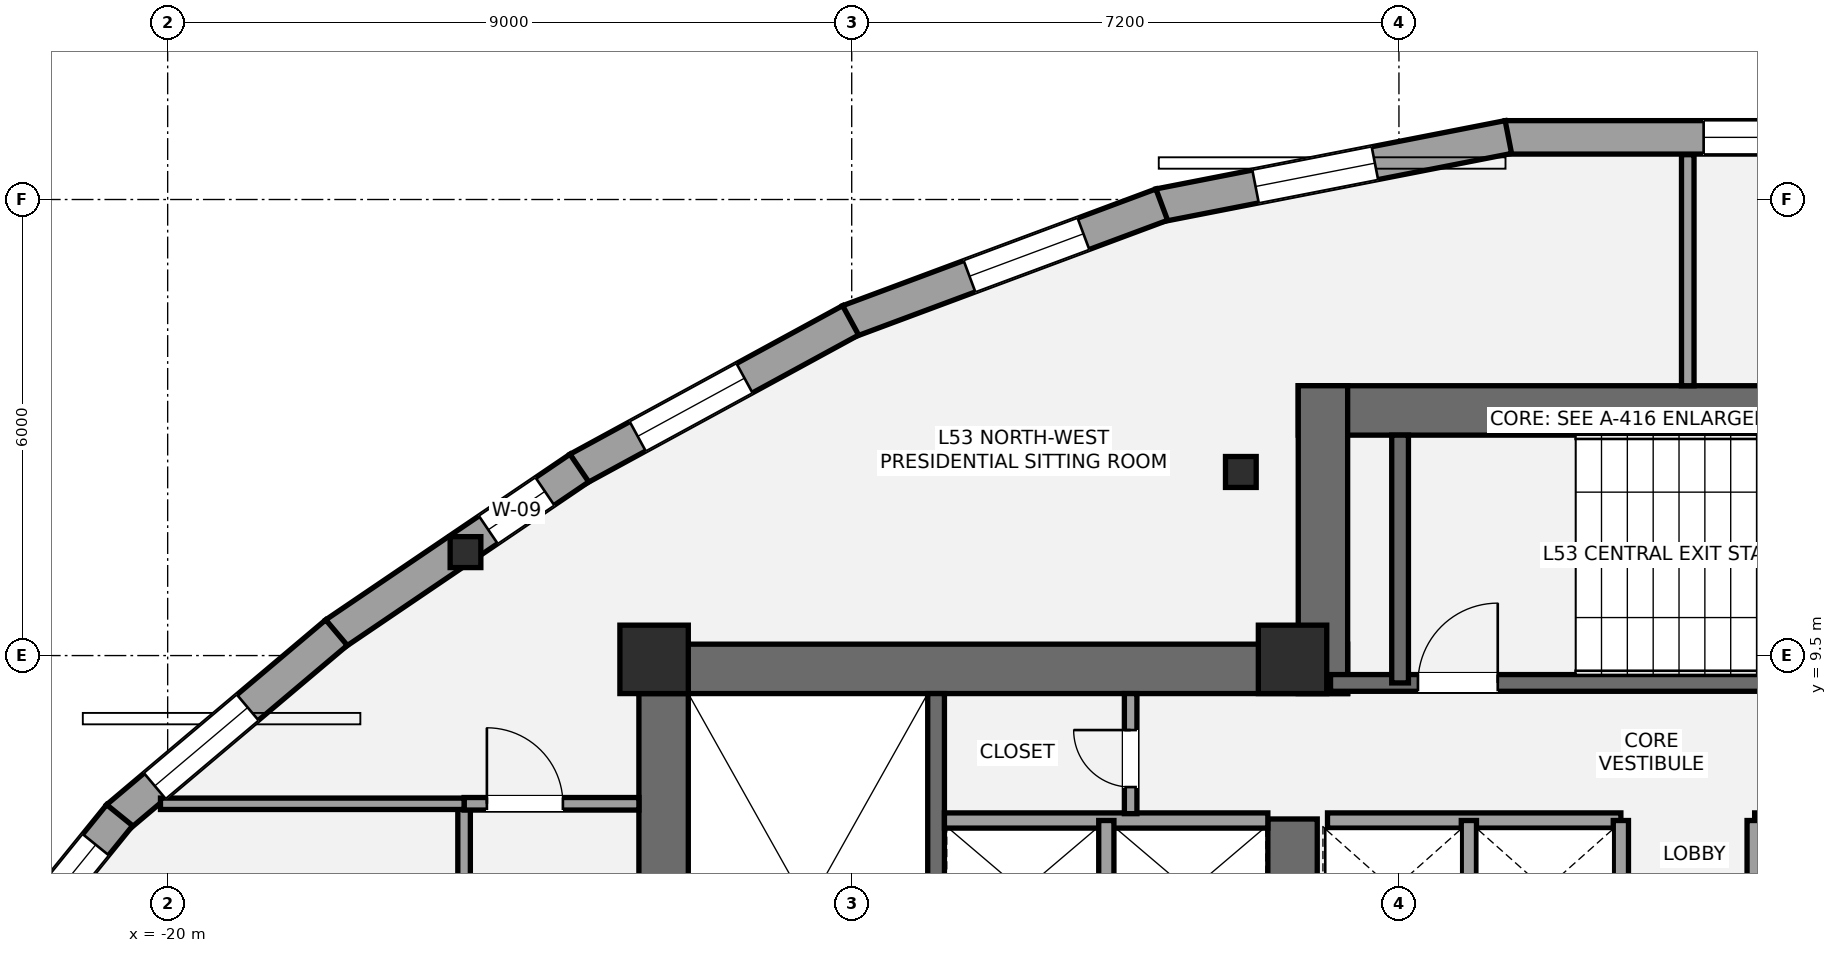
"""IFC4 building model, lengths in metres.
Left out: names, types, materials, properties, quantities, classifications, styles, units other than length and angle.
Written with IfcOpenShell. Run it as: python <this file> out.ifc"""

import sys

from ifc_helpers import new_model, si_unit, direction, frame, frame_2d, origin, origin_2d, place, context, subcontext, project, spatial, rectangle, i_section, extrude, element, fill, save


model = new_model("IFC4")
c1 = context("Model", 3, precision=1e-05, world=origin(), true_north=direction((0.0, 1.0)))
c2 = subcontext(c1, "Body", "Model", "MODEL_VIEW")
j1 = project(units=[si_unit("LENGTHUNIT", "METRE"), si_unit("PLANEANGLEUNIT", "RADIAN")], contexts=[c1])
p1 = place(None, origin())
s1 = spatial("IfcSite", under=j1, at=p1, CompositionType="ELEMENT")
p2 = place(p1, origin())
s2 = spatial("IfcBuilding", under=s1, at=p2, CompositionType="ELEMENT")
p3 = place(p2, frame((0.0, 0.0, 191.8)))
s3 = spatial("IfcBuildingStorey", under=s2, at=p3, CompositionType="ELEMENT", Elevation=191.8)
p4 = place(p3, frame((-13.475, 1.2, 0.0), z_axis=(0.0, 0.0, 1.0), x_axis=(0.0, 1.0, 0.0)))
e1 = element("IfcWall", 1, at=p4, inside=s3, PredefinedType="SHEAR", context=c2, shape_type="SweptSolid", body=[
    extrude(rectangle(XDim=8.45, YDim=0.65, at=frame_2d((4.225, 0.0))), origin(), (0.0, 0.0, 1.0), 3.2),
])
p5 = place(p3, frame((-13.8, 9.325, 0.0), z_axis=(0.0, 0.0, 1.0), x_axis=(1.0, 0.0, 0.0)))
e2 = element("IfcWall", 2, at=p5, inside=s3, PredefinedType="SHEAR", context=c2, shape_type="SweptSolid", body=[
    extrude(rectangle(XDim=9.325, YDim=0.65, at=frame_2d((4.663, 0.0))), origin(), (0.0, 0.0, 1.0), 3.2),
])
p6 = place(p3, frame((-5.2, 5.35, 0.0), z_axis=(0.0, 0.0, 1.0), x_axis=(0.0, 1.0, 0.0)))
e3 = element("IfcWall", 3, at=p6, inside=s3, PredefinedType="SHEAR", context=c2, shape_type="SweptSolid", body=[
    extrude(rectangle(XDim=2.0, YDim=0.65, at=frame_2d((1.0, 0.0))), origin(), (0.0, 0.0, 1.0), 3.2),
])
p7 = place(p3, frame((-9.89, 1.85, 0.0), z_axis=(0.0, 0.0, 1.0), x_axis=(0.0, 1.0, 0.0)))
e4 = element("IfcWall", 4, at=p7, inside=s3, PredefinedType="SHEAR", context=c2, shape_type="SweptSolid", body=[
    extrude(rectangle(XDim=7.15, YDim=0.22, at=frame_2d((3.575, 0.0))), origin(), (0.0, 0.0, 1.0), 3.2),
])
p8 = place(p3, frame((-5.125, 12.725, 0.0), z_axis=(0.0, 0.0, 1.0), x_axis=(1.0, 0.0, 0.0)))
e5 = element("IfcWall", 5, at=p8, inside=s3, PredefinedType="SHEAR", context=c2, shape_type="SweptSolid", body=[
    extrude(rectangle(XDim=10.25, YDim=0.65, at=frame_2d((5.125, 0.0))), origin(), (0.0, 0.0, 1.0), 3.2),
])
p9 = place(p3, frame((-4.8, 9.0, 0.0), z_axis=(0.0, 0.0, 1.0), x_axis=(0.0, 1.0, 0.0)))
e6 = element("IfcWall", 6, at=p9, inside=s3, PredefinedType="SHEAR", context=c2, shape_type="SweptSolid", body=[
    extrude(rectangle(XDim=4.05, YDim=0.65, at=frame_2d((2.025, 0.0))), origin(), (0.0, 0.0, 1.0), 3.2),
])
p10 = place(p3, frame((-4.7, 9.14, 0.0), z_axis=(0.0, 0.0, 1.0), x_axis=(1.0, 0.0, 0.0)))
e7 = element("IfcWall", 7, at=p10, inside=s3, PredefinedType="SHEAR", context=c2, shape_type="SweptSolid", body=[
    extrude(rectangle(XDim=9.3, YDim=0.22, at=frame_2d((4.65, 0.0))), origin(), (0.0, 0.0, 1.0), 3.2),
])
p11 = place(p10, frame((1.15, 0.0, 0.0)))
e8 = element("IfcOpeningElement", 8, at=p11, cuts=e7, PredefinedType="OPENING", context=c2, shape_type="SweptSolid", body=[
    extrude(rectangle(XDim=1.05, YDim=2.15, at=frame_2d((0.525, 1.075))), frame((0.0, 0.12, 0.0), z_axis=(0.0, -1.0, 0.0), x_axis=(1.0, 0.0, 0.0)), (0.0, 0.0, 1.0), 0.24),
])
p12 = place(p3, frame((-3.785, 9.14, 0.0), z_axis=(0.0, 0.0, 1.0), x_axis=(0.0, 1.0, 0.0)))
e9 = element("IfcWall", 9, at=p12, inside=s3, PredefinedType="SHEAR", context=c2, shape_type="SweptSolid", body=[
    extrude(rectangle(XDim=3.26, YDim=0.22, at=frame_2d((1.63, 0.0))), origin(), (0.0, 0.0, 1.0), 3.2),
])
for number, where, z_axis, x_axis in (
    (10, (-13.6, 9.45, 0.0), (0.0, 0.0, 1.0), (1.0, 0.0, 0.0)),
    (11, (-5.2, 9.45, 0.0), (0.0, 0.0, 1.0), (1.0, 0.0, 0.0)),
):
    element("IfcColumn", number, at=place(p3, frame(where, z_axis=z_axis, x_axis=x_axis)), inside=s3, PredefinedType="COLUMN", context=c2, shape_type="SweptSolid", body=[
        extrude(rectangle(XDim=0.9, YDim=0.9, at=origin_2d()), origin(), (0.0, 0.0, 1.0), 3.2),
    ])
for number, where, z_axis, x_axis in (
    (12, (-5.88, 11.915, 0.0), (0.0, 0.0, 1.0), (1.0, 0.0, 0.0)),
    (13, (-16.082, 10.861, 0.0), (0.0, 0.0, 1.0), (1.0, 0.0, 0.0)),
):
    element("IfcColumn", number, at=place(p3, frame(where, z_axis=z_axis, x_axis=x_axis)), inside=s3, PredefinedType="COLUMN", context=c2, shape_type="SweptSolid", body=[
        extrude(i_section(OverallWidth=0.404, OverallDepth=0.407, WebThickness=0.027, FlangeThickness=0.044, at=origin_2d()), origin(), (0.0, 0.0, 1.0), 3.2),
    ])
p13 = place(p3, frame((-2.403, 16.318, 0.0), z_axis=(0.0, 0.0, 1.0), x_axis=(1.0, 0.0, 0.0)))
e14 = element("IfcWall", 14, at=p13, inside=s3, PredefinedType="STANDARD", context=c2, shape_type="SweptSolid", body=[
    extrude(rectangle(XDim=4.805, YDim=0.44, at=frame_2d((2.403, 0.0))), origin(), (0.0, 0.0, 1.0), 2.315),
])
p14 = place(p13, frame((2.612, 0.0, 0.58)))
e15 = element("IfcOpeningElement", 15, at=p14, cuts=e14, PredefinedType="OPENING", context=c2, shape_type="SweptSolid", body=[
    extrude(rectangle(XDim=1.6, YDim=1.55, at=frame_2d((0.8, 0.775))), frame((0.0, 0.23, 0.0), z_axis=(0.0, -1.0, 0.0), x_axis=(1.0, 0.0, 0.0)), (0.0, 0.0, 1.0), 0.46),
])
p15 = place(p3, frame((-6.955, 15.423, 0.0), z_axis=(0.0, 0.0, 1.0), x_axis=(0.981406109785, 0.191942823979, 0.0)))
e16 = element("IfcWall", 16, at=p15, inside=s3, PredefinedType="STANDARD", context=c2, shape_type="SweptSolid", body=[
    extrude(rectangle(XDim=4.682, YDim=0.44, at=frame_2d((2.341, 0.0))), origin(), (0.0, 0.0, 1.0), 2.315),
])
p16 = place(p15, frame((1.293, 0.0, 0.58)))
e17 = element("IfcOpeningElement", 17, at=p16, cuts=e16, PredefinedType="OPENING", context=c2, shape_type="SweptSolid", body=[
    extrude(rectangle(XDim=1.6, YDim=1.55, at=frame_2d((0.8, 0.775))), frame((0.0, 0.23, 0.0), z_axis=(0.0, -1.0, 0.0), x_axis=(1.0, 0.0, 0.0)), (0.0, 0.0, 1.0), 0.46),
])
p17 = place(p3, frame((-11.042, 13.897, 0.0), z_axis=(0.0, 0.0, 1.0), x_axis=(0.937088879832, 0.349090863953, 0.0)))
e18 = element("IfcWall", 18, at=p17, inside=s3, PredefinedType="STANDARD", context=c2, shape_type="SweptSolid", body=[
    extrude(rectangle(XDim=4.398, YDim=0.44, at=frame_2d((2.199, 0.0))), origin(), (0.0, 0.0, 1.0), 2.315),
])
p18 = place(p17, frame((1.699, 0.0, 0.58)))
e19 = element("IfcOpeningElement", 19, at=p18, cuts=e18, PredefinedType="OPENING", context=c2, shape_type="SweptSolid", body=[
    extrude(rectangle(XDim=1.6, YDim=1.55, at=frame_2d((0.8, 0.775))), frame((0.0, 0.23, 0.0), z_axis=(0.0, -1.0, 0.0), x_axis=(1.0, 0.0, 0.0)), (0.0, 0.0, 1.0), 0.46),
])
p19 = place(p3, frame((-14.602, 11.956, 0.0), z_axis=(0.0, 0.0, 1.0), x_axis=(0.878158075839, 0.478370561217, 0.0)))
e20 = element("IfcWall", 20, at=p19, inside=s3, PredefinedType="STANDARD", context=c2, shape_type="SweptSolid", body=[
    extrude(rectangle(XDim=4.085, YDim=0.44, at=frame_2d((2.043, 0.0))), origin(), (0.0, 0.0, 1.0), 2.315),
])
p20 = place(p19, frame((0.895, 0.0, 0.58)))
e21 = element("IfcOpeningElement", 21, at=p20, cuts=e20, PredefinedType="OPENING", context=c2, shape_type="SweptSolid", body=[
    extrude(rectangle(XDim=1.6, YDim=1.55, at=frame_2d((0.8, 0.775))), frame((0.0, 0.23, 0.0), z_axis=(0.0, -1.0, 0.0), x_axis=(1.0, 0.0, 0.0)), (0.0, 0.0, 1.0), 0.46),
])
p21 = place(p3, frame((-17.797, 9.788, 0.0), z_axis=(0.0, 0.0, 1.0), x_axis=(0.827690675663, 0.561184591218, 0.0)))
e22 = element("IfcWall", 22, at=p21, inside=s3, PredefinedType="STANDARD", context=c2, shape_type="SweptSolid", body=[
    extrude(rectangle(XDim=3.882, YDim=0.44, at=frame_2d((1.941, 0.0))), origin(), (0.0, 0.0, 1.0), 2.315),
])
p22 = place(p21, frame((2.435, 0.0, 0.58)))
e23 = element("IfcOpeningElement", 23, at=p22, cuts=e22, PredefinedType="OPENING", context=c2, shape_type="SweptSolid", body=[
    extrude(rectangle(XDim=0.9, YDim=1.35, at=frame_2d((0.45, 0.675))), frame((0.0, 0.23, 0.0), z_axis=(0.0, -1.0, 0.0), x_axis=(1.0, 0.0, 0.0)), (0.0, 0.0, 1.0), 0.46),
])
p23 = place(p3, frame((-20.661, 7.37, 0.0), z_axis=(0.0, 0.0, 1.0), x_axis=(0.764269547527, 0.644896936512, 0.0)))
e24 = element("IfcWall", 24, at=p23, inside=s3, PredefinedType="STANDARD", context=c2, shape_type="SweptSolid", body=[
    extrude(rectangle(XDim=3.771, YDim=0.44, at=frame_2d((1.886, 0.0))), origin(), (0.0, 0.0, 1.0), 2.315),
])
p24 = place(p23, frame((0.643, 0.0, 0.58)))
e25 = element("IfcOpeningElement", 25, at=p24, cuts=e24, PredefinedType="OPENING", context=c2, shape_type="SweptSolid", body=[
    extrude(rectangle(XDim=1.6, YDim=1.55, at=frame_2d((0.8, 0.775))), frame((0.0, 0.23, 0.0), z_axis=(0.0, -1.0, 0.0), x_axis=(1.0, 0.0, 0.0)), (0.0, 0.0, 1.0), 0.46),
])
p25 = place(p3, frame((-22.897, 4.605, 0.0), z_axis=(0.0, 0.0, 1.0), x_axis=(0.629697919329, 0.776840093193, 0.0)))
e26 = element("IfcWall", 26, at=p25, inside=s3, PredefinedType="STANDARD", context=c2, shape_type="SweptSolid", body=[
    extrude(rectangle(XDim=3.597, YDim=0.44, at=frame_2d((1.799, 0.0))), origin(), (0.0, 0.0, 1.0), 2.315),
])
p26 = place(p25, frame((1.498, 0.0, 0.58)))
e27 = element("IfcOpeningElement", 27, at=p26, cuts=e26, PredefinedType="OPENING", context=c2, shape_type="SweptSolid", body=[
    extrude(rectangle(XDim=1.6, YDim=1.55, at=frame_2d((0.8, 0.775))), frame((0.0, 0.23, 0.0), z_axis=(0.0, -1.0, 0.0), x_axis=(1.0, 0.0, 0.0)), (0.0, 0.0, 1.0), 0.46),
])
p27 = place(p3, frame((-9.78, 7.33, 0.0), z_axis=(0.0, 0.0, 1.0), x_axis=(1.0, 0.0, 0.0)))
e28 = element("IfcWall", 28, at=p27, inside=s3, PredefinedType="SOLIDWALL", context=c2, shape_type="SweptSolid", body=[
    extrude(rectangle(XDim=4.255, YDim=0.2, at=frame_2d((2.127, 0.0))), origin(), (0.0, 0.0, 1.0), 3.02),
])
p28 = place(p3, frame((-7.65, 5.47, 0.0), z_axis=(0.0, 0.0, 1.0), x_axis=(0.0, 1.0, 0.0)))
e29 = element("IfcWall", 29, at=p28, inside=s3, PredefinedType="SOLIDWALL", context=c2, shape_type="SweptSolid", body=[
    extrude(rectangle(XDim=1.86, YDim=0.2, at=frame_2d((0.93, 0.0))), origin(), (0.0, 0.0, 1.0), 3.02),
])
for number, where, z_axis, x_axis in (
    (30, (-4.74, 7.33, 0.0), (0.0, 0.0, 1.0), (1.0, 0.0, 0.0)),
    (31, (0.88, 7.33, 0.0), (0.0, 0.0, 1.0), (1.0, 0.0, 0.0)),
):
    element("IfcWall", number, at=place(p3, frame(where, z_axis=z_axis, x_axis=x_axis)), inside=s3, PredefinedType="SOLIDWALL", context=c2, shape_type="SweptSolid", body=[
        extrude(rectangle(XDim=3.86, YDim=0.2, at=frame_2d((1.93, 0.0))), origin(), (0.0, 0.0, 1.0), 3.02),
    ])
for number, where, z_axis, x_axis in (
    (32, (-2.88, 5.52, 0.0), (0.0, 0.0, 1.0), (0.0, 1.0, 0.0)),
    (33, (-0.88, 5.52, 0.0), (0.0, 0.0, 1.0), (0.0, 1.0, 0.0)),
    (34, (0.88, 5.52, 0.0), (0.0, 0.0, 1.0), (0.0, 1.0, 0.0)),
):
    element("IfcWall", number, at=place(p3, frame(where, z_axis=z_axis, x_axis=x_axis)), inside=s3, PredefinedType="SOLIDWALL", context=c2, shape_type="SweptSolid", body=[
        extrude(rectangle(XDim=1.81, YDim=0.2, at=frame_2d((0.905, 0.0))), origin(), (0.0, 0.0, 1.0), 3.02),
    ])
p29 = place(p3, frame((-7.33, 7.42, 0.0), z_axis=(0.0, 0.0, 1.0), x_axis=(0.0, 1.0, 0.0)))
e35 = element("IfcWall", 35, at=p29, inside=s3, PredefinedType="PARTITIONING", context=c2, shape_type="SweptSolid", body=[
    extrude(rectangle(XDim=1.58, YDim=0.165, at=frame_2d((0.79, 0.0))), origin(), (0.0, 0.0, 1.0), 3.02),
])
p30 = place(p29, frame((0.35, 0.0, 0.0)))
e36 = element("IfcOpeningElement", 36, at=p30, cuts=e35, PredefinedType="OPENING", context=c2, shape_type="SweptSolid", body=[
    extrude(rectangle(XDim=0.75, YDim=2.1, at=frame_2d((0.375, 1.05))), frame((0.0, 0.093, 0.0), z_axis=(0.0, -1.0, 0.0), x_axis=(1.0, 0.0, 0.0)), (0.0, 0.0, 1.0), 0.185),
])
p31 = place(p3, frame((-16.1, -10.663, 0.0), z_axis=(0.0, 0.0, 1.0), x_axis=(0.0, 1.0, 0.0)))
e37 = element("IfcWall", 37, at=p31, inside=s3, PredefinedType="PARTITIONING", context=c2, shape_type="SweptSolid", body=[
    extrude(rectangle(XDim=18.213, YDim=0.165, at=frame_2d((9.107, 0.0))), origin(), (0.0, 0.0, 1.0), 2.473),
])
p32 = place(p31, frame((3.664, 0.0, 0.0)))
e38 = element("IfcOpeningElement", 38, at=p32, cuts=e37, PredefinedType="OPENING", context=c2, shape_type="SweptSolid", body=[
    extrude(rectangle(XDim=0.85, YDim=2.1, at=frame_2d((0.425, 1.05))), frame((0.0, 0.093, 0.0), z_axis=(0.0, -1.0, 0.0), x_axis=(1.0, 0.0, 0.0)), (0.0, 0.0, 1.0), 0.185),
])
p33 = place(p31, frame((6.839, 0.0, 0.0)))
e39 = element("IfcOpeningElement", 39, at=p33, cuts=e37, PredefinedType="OPENING", context=c2, shape_type="SweptSolid", body=[
    extrude(rectangle(XDim=1.0, YDim=2.15, at=frame_2d((0.5, 1.075))), frame((0.0, 0.093, 0.0), z_axis=(0.0, -1.0, 0.0), x_axis=(1.0, 0.0, 0.0)), (0.0, 0.0, 1.0), 0.185),
])
p34 = place(p31, frame((11.264, 0.0, 0.0)))
e40 = element("IfcOpeningElement", 40, at=p34, cuts=e37, PredefinedType="OPENING", context=c2, shape_type="SweptSolid", body=[
    extrude(rectangle(XDim=1.0, YDim=2.15, at=frame_2d((0.5, 1.075))), frame((0.0, 0.093, 0.0), z_axis=(0.0, -1.0, 0.0), x_axis=(1.0, 0.0, 0.0)), (0.0, 0.0, 1.0), 0.185),
])
p35 = place(p31, frame((15.539, 0.0, 0.0)))
e41 = element("IfcOpeningElement", 41, at=p35, cuts=e37, PredefinedType="OPENING", context=c2, shape_type="SweptSolid", body=[
    extrude(rectangle(XDim=1.0, YDim=2.15, at=frame_2d((0.5, 1.075))), frame((0.0, 0.093, 0.0), z_axis=(0.0, -1.0, 0.0), x_axis=(1.0, 0.0, 0.0)), (0.0, 0.0, 1.0), 0.185),
])
p36 = place(p3, frame((-16.1, 7.55, 0.0), z_axis=(0.0, 0.0, 1.0), x_axis=(1.0, 0.0, 0.0)))
e42 = element("IfcWall", 42, at=p36, inside=s3, PredefinedType="PARTITIONING", context=c2, shape_type="SweptSolid", body=[
    extrude(rectangle(XDim=2.3, YDim=0.165, at=frame_2d((1.15, 0.0))), origin(), (0.0, 0.0, 1.0), 3.02),
])
p37 = place(p36, frame((0.3, 0.0, 0.0)))
e43 = element("IfcOpeningElement", 43, at=p37, cuts=e42, PredefinedType="OPENING", context=c2, shape_type="SweptSolid", body=[
    extrude(rectangle(XDim=1.0, YDim=2.15, at=frame_2d((0.5, 1.075))), frame((0.0, 0.093, 0.0), z_axis=(0.0, -1.0, 0.0), x_axis=(1.0, 0.0, 0.0)), (0.0, 0.0, 1.0), 0.185),
])
p38 = place(p3, frame((-20.094, 7.55, 0.0), z_axis=(0.0, 0.0, 1.0), x_axis=(1.0, 0.0, 0.0)))
e44 = element("IfcWall", 44, at=p38, inside=s3, PredefinedType="PLUMBINGWALL", context=c2, shape_type="SweptSolid", body=[
    extrude(rectangle(XDim=3.994, YDim=0.15, at=frame_2d((1.997, 0.0))), origin(), (0.0, 0.0, 1.0), 2.473),
])
p39 = place(p3, frame((0.0, 13.05, 0.0), z_axis=(0.0, 0.0, 1.0), x_axis=(0.0, 1.0, 0.0)))
e45 = element("IfcWall", 45, at=p39, inside=s3, PredefinedType="PARTITIONING", context=c2, shape_type="SweptSolid", body=[
    extrude(rectangle(XDim=3.04, YDim=0.165, at=frame_2d((1.52, 0.0))), origin(), (0.0, 0.0, 1.0), 3.02),
])
p40 = place(p14, origin())
e46 = element("IfcWindow", 46, at=p40, inside=s3, PartitioningType="SINGLE_PANEL", PredefinedType="WINDOW", context=c2, shape_type="SweptSolid", body=[
    extrude(rectangle(XDim=1.6, YDim=1.55, at=frame_2d((0.8, 0.775))), frame((0.0, -0.01, 0.0), z_axis=(0.0, -1.0, 0.0), x_axis=(1.0, 0.0, 0.0)), (0.0, 0.0, 1.0), 0.06),
])
fill(e15, e46)
p41 = place(p16, origin())
e47 = element("IfcWindow", 47, at=p41, inside=s3, PartitioningType="SINGLE_PANEL", PredefinedType="WINDOW", context=c2, shape_type="SweptSolid", body=[
    extrude(rectangle(XDim=1.6, YDim=1.55, at=frame_2d((0.8, 0.775))), frame((0.0, -0.01, 0.0), z_axis=(0.0, -1.0, 0.0), x_axis=(1.0, 0.0, 0.0)), (0.0, 0.0, 1.0), 0.06),
])
fill(e17, e47)
p42 = place(p18, origin())
e48 = element("IfcWindow", 48, at=p42, inside=s3, PartitioningType="SINGLE_PANEL", PredefinedType="WINDOW", context=c2, shape_type="SweptSolid", body=[
    extrude(rectangle(XDim=1.6, YDim=1.55, at=frame_2d((0.8, 0.775))), frame((0.0, -0.01, 0.0), z_axis=(0.0, -1.0, 0.0), x_axis=(1.0, 0.0, 0.0)), (0.0, 0.0, 1.0), 0.06),
])
fill(e19, e48)
p43 = place(p20, origin())
e49 = element("IfcWindow", 49, at=p43, inside=s3, PartitioningType="SINGLE_PANEL", PredefinedType="WINDOW", context=c2, shape_type="SweptSolid", body=[
    extrude(rectangle(XDim=1.6, YDim=1.55, at=frame_2d((0.8, 0.775))), frame((0.0, -0.01, 0.0), z_axis=(0.0, -1.0, 0.0), x_axis=(1.0, 0.0, 0.0)), (0.0, 0.0, 1.0), 0.06),
])
fill(e21, e49)
p44 = place(p22, origin())
e50 = element("IfcWindow", 50, at=p44, inside=s3, PartitioningType="SINGLE_PANEL", PredefinedType="WINDOW", context=c2, shape_type="SweptSolid", body=[
    extrude(rectangle(XDim=0.9, YDim=1.35, at=frame_2d((0.45, 0.675))), frame((0.0, -0.01, 0.0), z_axis=(0.0, -1.0, 0.0), x_axis=(1.0, 0.0, 0.0)), (0.0, 0.0, 1.0), 0.06),
])
fill(e23, e50)
p45 = place(p24, origin())
e51 = element("IfcWindow", 51, at=p45, inside=s3, PartitioningType="SINGLE_PANEL", PredefinedType="WINDOW", context=c2, shape_type="SweptSolid", body=[
    extrude(rectangle(XDim=1.6, YDim=1.55, at=frame_2d((0.8, 0.775))), frame((0.0, -0.01, 0.0), z_axis=(0.0, -1.0, 0.0), x_axis=(1.0, 0.0, 0.0)), (0.0, 0.0, 1.0), 0.06),
])
fill(e25, e51)
p46 = place(p26, origin())
e52 = element("IfcWindow", 52, at=p46, inside=s3, PartitioningType="SINGLE_PANEL", PredefinedType="WINDOW", context=c2, shape_type="SweptSolid", body=[
    extrude(rectangle(XDim=1.6, YDim=1.55, at=frame_2d((0.8, 0.775))), frame((0.0, -0.01, 0.0), z_axis=(0.0, -1.0, 0.0), x_axis=(1.0, 0.0, 0.0)), (0.0, 0.0, 1.0), 0.06),
])
fill(e27, e52)
p47 = place(p11, origin())
e53 = element("IfcDoor", 53, at=p47, inside=s3, OperationType="SINGLE_SWING_RIGHT", PredefinedType="DOOR", context=c2, shape_type="SweptSolid", body=[
    extrude(rectangle(XDim=1.05, YDim=2.15, at=frame_2d((0.525, 1.075))), frame((0.0, 0.025, 0.0), z_axis=(0.0, -1.0, 0.0), x_axis=(1.0, 0.0, 0.0)), (0.0, 0.0, 1.0), 0.05),
])
fill(e8, e53)
p48 = place(p30, origin())
e54 = element("IfcDoor", 54, at=p48, inside=s3, OperationType="SINGLE_SWING_RIGHT", PredefinedType="DOOR", context=c2, shape_type="SweptSolid", body=[
    extrude(rectangle(XDim=0.75, YDim=2.1, at=frame_2d((0.375, 1.05))), frame((0.0, 0.025, 0.0), z_axis=(0.0, -1.0, 0.0), x_axis=(1.0, 0.0, 0.0)), (0.0, 0.0, 1.0), 0.05),
])
fill(e36, e54)
p49 = place(p37, origin())
e55 = element("IfcDoor", 55, at=p49, inside=s3, OperationType="SINGLE_SWING_LEFT", PredefinedType="DOOR", context=c2, shape_type="SweptSolid", body=[
    extrude(rectangle(XDim=1.0, YDim=2.15, at=frame_2d((0.5, 1.075))), frame((0.0, 0.025, 0.0), z_axis=(0.0, -1.0, 0.0), x_axis=(1.0, 0.0, 0.0)), (0.0, 0.0, 1.0), 0.05),
])
fill(e43, e55)
save(model, sys.argv[1])
